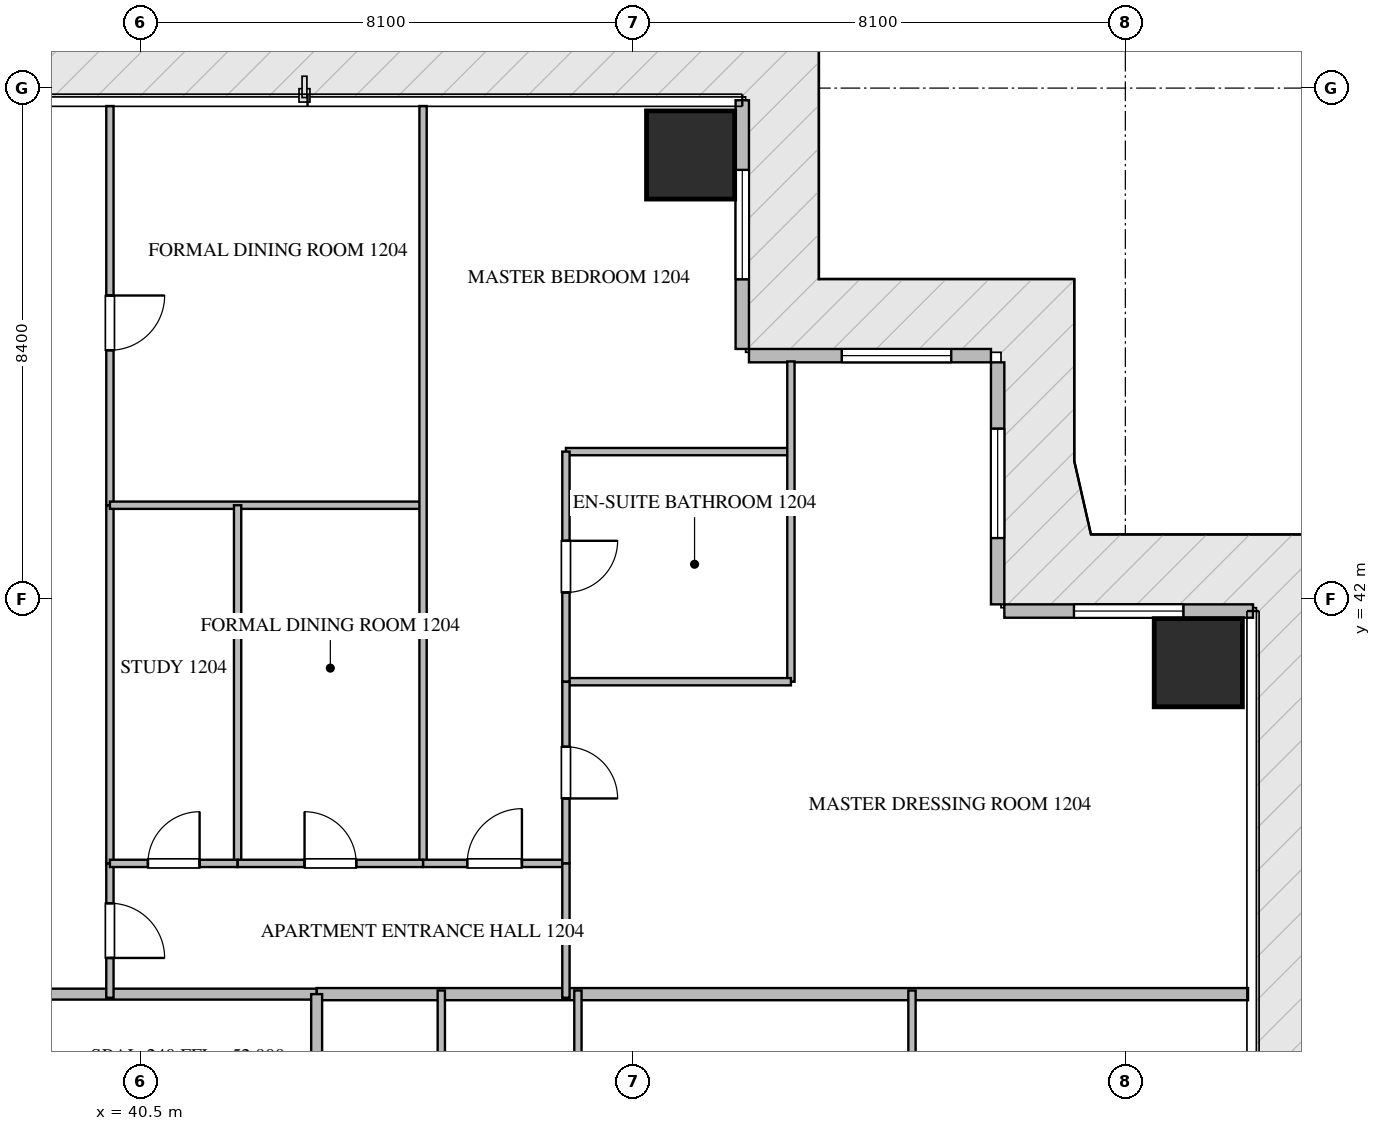
"""IFC4 building model, lengths in metres.
Left out: names, types, materials, properties, quantities, classifications, styles, units other than length and angle.
Written with IfcOpenShell. Run it as: python <this file> out.ifc"""

import sys

from ifc_helpers import new_model, si_unit, direction, frame, frame_2d, origin, origin_2d, place, context, subcontext, project, spatial, rectangle, extrude, source, transform, mapped, element, fill, save


model = new_model("IFC4")
c1 = context("Model", 3, precision=1e-05, world=origin(), true_north=direction((0.0, 1.0)))
c2 = subcontext(c1, "Body", "Model", "MODEL_VIEW")
j1 = project(units=[si_unit("LENGTHUNIT", "METRE"), si_unit("PLANEANGLEUNIT", "RADIAN")], contexts=[c1])
p1 = place(None, origin())
s1 = spatial("IfcSite", under=j1, at=p1, CompositionType="ELEMENT")
p2 = place(p1, origin())
s2 = spatial("IfcBuilding", under=s1, at=p2, CompositionType="ELEMENT")
p3 = place(p2, frame((0.0, 0.0, 52.95)))
s3 = spatial("IfcBuildingStorey", under=s2, at=p3, CompositionType="ELEMENT", Elevation=52.95)
m1 = source(origin(), c2, "Body", "SweptSolid", [
    extrude(rectangle(XDim=1.45, YDim=1.45, at=origin_2d()), origin(), (0.0, 0.0, 1.0), 3.75),
])
for number, where, z_axis, x_axis in (
    (1, (49.55, 49.3, -0.26), (0.0, 0.0, 1.0), (1.0, 0.0, 0.0)),
    (2, (57.9, 40.95, -0.26), (0.0, 0.0, 1.0), (1.0, 0.0, 0.0)),
):
    element("IfcColumn", number, at=place(p3, frame(where, z_axis=z_axis, x_axis=x_axis)), inside=s3, PredefinedType="COLUMN", context=c2, shape_type="MappedRepresentation", body=[
        mapped(m1, transform((0.0, 0.0, 0.0), scale=1.0)),
    ])
p4 = place(p3, frame((58.8, 41.8, 0.0), z_axis=(0.0, 0.0, 1.0), x_axis=(-1.0, 0.0, 0.0)))
e3 = element("IfcWall", 3, at=p4, inside=s3, PredefinedType="ELEMENTEDWALL", context=c2, shape_type="SweptSolid", body=[
    extrude(rectangle(XDim=4.09, YDim=0.22, at=frame_2d((2.045, 0.0))), origin(), (0.0, 0.0, 1.0), 3.475),
])
p5 = place(p4, frame((1.145, 0.0, 0.65)))
e4 = element("IfcOpeningElement", 4, at=p5, cuts=e3, PredefinedType="OPENING", context=c2, shape_type="SweptSolid", body=[
    extrude(rectangle(XDim=1.8, YDim=2.1, at=frame_2d((0.9, 1.05))), frame((0.0, 0.12, 0.0), z_axis=(0.0, -1.0, 0.0), x_axis=(1.0, 0.0, 0.0)), (0.0, 0.0, 1.0), 0.24),
])
p6 = place(p3, frame((54.6, 41.91, 0.0), z_axis=(0.0, 0.0, 1.0), x_axis=(0.0, 1.0, 0.0)))
e5 = element("IfcWall", 5, at=p6, inside=s3, PredefinedType="ELEMENTEDWALL", context=c2, shape_type="SweptSolid", body=[
    extrude(rectangle(XDim=3.98, YDim=0.22, at=frame_2d((1.99, 0.0))), origin(), (0.0, 0.0, 1.0), 3.475),
])
p7 = place(p6, frame((1.09, 0.0, 0.65)))
e6 = element("IfcOpeningElement", 6, at=p7, cuts=e5, PredefinedType="OPENING", context=c2, shape_type="SweptSolid", body=[
    extrude(rectangle(XDim=1.8, YDim=2.1, at=frame_2d((0.9, 1.05))), frame((0.0, 0.12, 0.0), z_axis=(0.0, -1.0, 0.0), x_axis=(1.0, 0.0, 0.0)), (0.0, 0.0, 1.0), 0.24),
])
p8 = place(p3, frame((54.49, 46.0, 0.0), z_axis=(0.0, 0.0, 1.0), x_axis=(-1.0, 0.0, 0.0)))
e7 = element("IfcWall", 7, at=p8, inside=s3, PredefinedType="ELEMENTEDWALL", context=c2, shape_type="SweptSolid", body=[
    extrude(rectangle(XDim=3.98, YDim=0.22, at=frame_2d((1.99, 0.0))), origin(), (0.0, 0.0, 1.0), 3.475),
])
p9 = place(p8, frame((0.654, 0.0, 0.65)))
e8 = element("IfcOpeningElement", 8, at=p9, cuts=e7, PredefinedType="OPENING", context=c2, shape_type="SweptSolid", body=[
    extrude(rectangle(XDim=1.8, YDim=2.1, at=frame_2d((0.9, 1.05))), frame((0.0, 0.12, 0.0), z_axis=(0.0, -1.0, 0.0), x_axis=(1.0, 0.0, 0.0)), (0.0, 0.0, 1.0), 0.24),
])
p10 = place(p3, frame((50.4, 46.11, 0.0), z_axis=(0.0, 0.0, 1.0), x_axis=(0.0, 1.0, 0.0)))
e9 = element("IfcWall", 9, at=p10, inside=s3, PredefinedType="ELEMENTEDWALL", context=c2, shape_type="SweptSolid", body=[
    extrude(rectangle(XDim=4.09, YDim=0.22, at=frame_2d((2.045, 0.0))), origin(), (0.0, 0.0, 1.0), 3.475),
])
p11 = place(p10, frame((1.145, 0.0, 0.65)))
e10 = element("IfcOpeningElement", 10, at=p11, cuts=e9, PredefinedType="OPENING", context=c2, shape_type="SweptSolid", body=[
    extrude(rectangle(XDim=1.8, YDim=2.1, at=frame_2d((0.9, 1.05))), frame((0.0, 0.12, 0.0), z_axis=(0.0, -1.0, 0.0), x_axis=(1.0, 0.0, 0.0)), (0.0, 0.0, 1.0), 0.24),
])
p12 = place(p3, frame((43.4, 35.5, 0.0), z_axis=(0.0, 0.0, 1.0), x_axis=(1.0, 0.0, 0.0)))
e11 = element("IfcWall", 11, at=p12, inside=s3, PredefinedType="PARTITIONING", context=c2, shape_type="SweptSolid", body=[
    extrude(rectangle(XDim=15.318, YDim=0.2, at=frame_2d((7.659, 0.0))), origin(), (0.0, 0.0, 1.0), 3.49),
])
p13 = place(p3, frame((21.402, 35.5, 0.0), z_axis=(0.0, 0.0, 1.0), x_axis=(1.0, 0.0, 0.0)))
e12 = element("IfcWall", 12, at=p13, inside=s3, PredefinedType="PARTITIONING", context=c2, shape_type="SweptSolid", body=[
    extrude(rectangle(XDim=21.996, YDim=0.18, at=frame_2d((10.998, 0.0))), origin(), (0.0, 0.0, 1.0), 3.49),
])
p14 = place(p13, frame((15.222, 0.0, 0.0)))
e13 = element("IfcOpeningElement", 13, at=p14, cuts=e12, PredefinedType="OPENING", context=c2, shape_type="SweptSolid", body=[
    extrude(rectangle(XDim=1.0, YDim=2.15, at=frame_2d((0.5, 1.075))), frame((0.0, 0.1, 0.0), z_axis=(0.0, -1.0, 0.0), x_axis=(1.0, 0.0, 0.0)), (0.0, 0.0, 1.0), 0.2),
])
p15 = place(p3, frame((43.4, 14.9, 0.0), z_axis=(0.0, 0.0, 1.0), x_axis=(0.0, 1.0, 0.0)))
e14 = element("IfcWall", 14, at=p15, inside=s3, PredefinedType="PARTITIONING", context=c2, shape_type="SweptSolid", body=[
    extrude(rectangle(XDim=20.6, YDim=0.18, at=frame_2d((10.3, 0.0))), origin(), (0.0, 0.0, 1.0), 3.49),
])
p16 = place(p15, frame((5.821, 0.0, 0.0)))
e15 = element("IfcOpeningElement", 15, at=p16, cuts=e14, PredefinedType="OPENING", context=c2, shape_type="SweptSolid", body=[
    extrude(rectangle(XDim=1.0, YDim=2.15, at=frame_2d((0.5, 1.075))), frame((0.0, 0.1, 0.0), z_axis=(0.0, -1.0, 0.0), x_axis=(1.0, 0.0, 0.0)), (0.0, 0.0, 1.0), 0.2),
])
p17 = place(p15, frame((10.898, 0.0, 0.0)))
e16 = element("IfcOpeningElement", 16, at=p17, cuts=e14, PredefinedType="OPENING", context=c2, shape_type="SweptSolid", body=[
    extrude(rectangle(XDim=1.0, YDim=2.15, at=frame_2d((0.5, 1.075))), frame((0.0, 0.1, 0.0), z_axis=(0.0, -1.0, 0.0), x_axis=(1.0, 0.0, 0.0)), (0.0, 0.0, 1.0), 0.2),
])
p18 = place(p3, frame((40.0, 37.65, 0.0), z_axis=(0.0, 0.0, 1.0), x_axis=(0.0, -1.0, 0.0)))
e17 = element("IfcWall", 17, at=p18, inside=s3, PredefinedType="PARTITIONING", context=c2, shape_type="SweptSolid", body=[
    extrude(rectangle(XDim=2.21, YDim=0.12, at=frame_2d((1.105, 0.0))), origin(), (0.0, 0.0, 1.0), 3.49),
])
p19 = place(p18, frame((0.655, 0.0, 0.0)))
e18 = element("IfcOpeningElement", 18, at=p19, cuts=e17, PredefinedType="OPENING", context=c2, shape_type="SweptSolid", body=[
    extrude(rectangle(XDim=0.9, YDim=2.1, at=frame_2d((0.45, 1.05))), frame((0.0, 0.07, 0.0), z_axis=(0.0, -1.0, 0.0), x_axis=(1.0, 0.0, 0.0)), (0.0, 0.0, 1.0), 0.14),
])
p20 = place(p3, frame((40.0, 50.105, 0.0), z_axis=(0.0, 0.0, 1.0), x_axis=(0.0, -1.0, 0.0)))
e19 = element("IfcWall", 19, at=p20, inside=s3, PredefinedType="PARTITIONING", context=c2, shape_type="SweptSolid", body=[
    extrude(rectangle(XDim=6.565, YDim=0.12, at=frame_2d((3.282, 0.0))), origin(), (0.0, 0.0, 1.0), 3.49),
])
p21 = place(p20, frame((3.116, 0.0, 0.0)))
e20 = element("IfcOpeningElement", 20, at=p21, cuts=e19, PredefinedType="OPENING", context=c2, shape_type="SweptSolid", body=[
    extrude(rectangle(XDim=0.9, YDim=2.1, at=frame_2d((0.45, 1.05))), frame((0.0, 0.07, 0.0), z_axis=(0.0, -1.0, 0.0), x_axis=(1.0, 0.0, 0.0)), (0.0, 0.0, 1.0), 0.14),
])
p22 = place(p3, frame((40.0, 43.538, 0.0), z_axis=(0.0, 0.0, 1.0), x_axis=(0.0, -1.0, 0.0)))
e21 = element("IfcWall", 21, at=p22, inside=s3, PredefinedType="PARTITIONING", context=c2, shape_type="SweptSolid", body=[
    extrude(rectangle(XDim=5.886, YDim=0.12, at=frame_2d((2.943, 0.0))), origin(), (0.0, 0.0, 1.0), 3.49),
])
p23 = place(p3, frame((40.0, 43.54, 0.0), z_axis=(0.0, 0.0, 1.0), x_axis=(1.0, 0.0, 0.0)))
e22 = element("IfcWall", 22, at=p23, inside=s3, PredefinedType="PARTITIONING", context=c2, shape_type="SweptSolid", body=[
    extrude(rectangle(XDim=5.15, YDim=0.12, at=frame_2d((2.575, 0.0))), origin(), (0.0, 0.0, 1.0), 3.49),
])
p24 = place(p3, frame((45.15, 50.105, 0.0), z_axis=(0.0, 0.0, 1.0), x_axis=(0.0, -1.0, 0.0)))
e23 = element("IfcWall", 23, at=p24, inside=s3, PredefinedType="PARTITIONING", context=c2, shape_type="SweptSolid", body=[
    extrude(rectangle(XDim=12.455, YDim=0.12, at=frame_2d((6.228, 0.0))), origin(), (0.0, 0.0, 1.0), 3.49),
])
p25 = place(p3, frame((42.1, 43.54, 0.0), z_axis=(0.0, 0.0, 1.0), x_axis=(0.0, -1.0, 0.0)))
e24 = element("IfcWall", 24, at=p25, inside=s3, PredefinedType="PARTITIONING", context=c2, shape_type="SweptSolid", body=[
    extrude(rectangle(XDim=5.89, YDim=0.12, at=frame_2d((2.945, 0.0))), origin(), (0.0, 0.0, 1.0), 3.49),
])
p26 = place(p3, frame((40.0, 37.65, 0.0), z_axis=(0.0, 0.0, 1.0), x_axis=(1.0, 0.0, 0.0)))
e25 = element("IfcWall", 25, at=p26, inside=s3, PredefinedType="PARTITIONING", context=c2, shape_type="SweptSolid", body=[
    extrude(rectangle(XDim=2.1, YDim=0.12, at=frame_2d((1.05, 0.0))), origin(), (0.0, 0.0, 1.0), 3.49),
])
p27 = place(p26, frame((0.625, 0.0, 0.0)))
e26 = element("IfcOpeningElement", 26, at=p27, cuts=e25, PredefinedType="OPENING", context=c2, shape_type="SweptSolid", body=[
    extrude(rectangle(XDim=0.85, YDim=2.1, at=frame_2d((0.425, 1.05))), frame((0.0, 0.07, 0.0), z_axis=(0.0, -1.0, 0.0), x_axis=(1.0, 0.0, 0.0)), (0.0, 0.0, 1.0), 0.14),
])
p28 = place(p3, frame((42.102, 37.65, 0.0), z_axis=(0.0, 0.0, 1.0), x_axis=(1.0, 0.0, 0.0)))
e27 = element("IfcWall", 27, at=p28, inside=s3, PredefinedType="PARTITIONING", context=c2, shape_type="SweptSolid", body=[
    extrude(rectangle(XDim=3.048, YDim=0.12, at=frame_2d((1.524, 0.0))), origin(), (0.0, 0.0, 1.0), 3.49),
])
p29 = place(p28, frame((1.099, 0.0, 0.0)))
e28 = element("IfcOpeningElement", 28, at=p29, cuts=e27, PredefinedType="OPENING", context=c2, shape_type="SweptSolid", body=[
    extrude(rectangle(XDim=0.85, YDim=2.1, at=frame_2d((0.425, 1.05))), frame((0.0, 0.07, 0.0), z_axis=(0.0, -1.0, 0.0), x_axis=(1.0, 0.0, 0.0)), (0.0, 0.0, 1.0), 0.14),
])
p30 = place(p3, frame((45.152, 37.65, 0.0), z_axis=(0.0, 0.0, 1.0), x_axis=(1.0, 0.0, 0.0)))
e29 = element("IfcWall", 29, at=p30, inside=s3, PredefinedType="PARTITIONING", context=c2, shape_type="SweptSolid", body=[
    extrude(rectangle(XDim=2.348, YDim=0.12, at=frame_2d((1.174, 0.0))), origin(), (0.0, 0.0, 1.0), 3.49),
])
p31 = place(p30, frame((0.724, 0.0, 0.0)))
e30 = element("IfcOpeningElement", 30, at=p31, cuts=e29, PredefinedType="OPENING", context=c2, shape_type="SweptSolid", body=[
    extrude(rectangle(XDim=0.9, YDim=2.1, at=frame_2d((0.45, 1.05))), frame((0.0, 0.07, 0.0), z_axis=(0.0, -1.0, 0.0), x_axis=(1.0, 0.0, 0.0)), (0.0, 0.0, 1.0), 0.14),
])
p32 = place(p3, frame((47.5, 44.422, 0.0), z_axis=(0.0, 0.0, 1.0), x_axis=(1.0, 0.0, 0.0)))
e31 = element("IfcWall", 31, at=p32, inside=s3, PredefinedType="PARTITIONING", context=c2, shape_type="SweptSolid", body=[
    extrude(rectangle(XDim=3.7, YDim=0.12, at=frame_2d((1.85, 0.0))), origin(), (0.0, 0.0, 1.0), 3.49),
])
p33 = place(p3, frame((51.2, 45.905, 0.0), z_axis=(0.0, 0.0, 1.0), x_axis=(0.0, -1.0, 0.0)))
e32 = element("IfcWall", 32, at=p33, inside=s3, PredefinedType="PARTITIONING", context=c2, shape_type="SweptSolid", body=[
    extrude(rectangle(XDim=5.267, YDim=0.12, at=frame_2d((2.634, 0.0))), origin(), (0.0, 0.0, 1.0), 3.49),
])
p34 = place(p3, frame((47.5, 40.638, 0.0), z_axis=(0.0, 0.0, 1.0), x_axis=(1.0, 0.0, 0.0)))
e33 = element("IfcWall", 33, at=p34, inside=s3, PredefinedType="PARTITIONING", context=c2, shape_type="SweptSolid", body=[
    extrude(rectangle(XDim=3.7, YDim=0.12, at=frame_2d((1.85, 0.0))), origin(), (0.0, 0.0, 1.0), 3.49),
])
p35 = place(p3, frame((47.5, 44.422, 0.0), z_axis=(0.0, 0.0, 1.0), x_axis=(0.0, -1.0, 0.0)))
e34 = element("IfcWall", 34, at=p35, inside=s3, PredefinedType="PARTITIONING", context=c2, shape_type="SweptSolid", body=[
    extrude(rectangle(XDim=3.784, YDim=0.12, at=frame_2d((1.892, 0.0))), origin(), (0.0, 0.0, 1.0), 3.49),
])
p36 = place(p35, frame((1.467, 0.0, 0.0)))
e35 = element("IfcOpeningElement", 35, at=p36, cuts=e34, PredefinedType="OPENING", context=c2, shape_type="SweptSolid", body=[
    extrude(rectangle(XDim=0.85, YDim=2.1, at=frame_2d((0.425, 1.05))), frame((0.0, 0.07, 0.0), z_axis=(0.0, -1.0, 0.0), x_axis=(1.0, 0.0, 0.0)), (0.0, 0.0, 1.0), 0.14),
])
p37 = place(p3, frame((47.5, 40.636, 0.0), z_axis=(0.0, 0.0, 1.0), x_axis=(0.0, -1.0, 0.0)))
e36 = element("IfcWall", 36, at=p37, inside=s3, PredefinedType="PARTITIONING", context=c2, shape_type="SweptSolid", body=[
    extrude(rectangle(XDim=2.986, YDim=0.12, at=frame_2d((1.493, 0.0))), origin(), (0.0, 0.0, 1.0), 3.49),
])
p38 = place(p37, frame((1.068, 0.0, 0.0)))
e37 = element("IfcOpeningElement", 37, at=p38, cuts=e36, PredefinedType="OPENING", context=c2, shape_type="SweptSolid", body=[
    extrude(rectangle(XDim=0.85, YDim=2.1, at=frame_2d((0.425, 1.05))), frame((0.0, 0.07, 0.0), z_axis=(0.0, -1.0, 0.0), x_axis=(1.0, 0.0, 0.0)), (0.0, 0.0, 1.0), 0.14),
])
p39 = place(p3, frame((47.5, 37.648, 0.0), z_axis=(0.0, 0.0, 1.0), x_axis=(0.0, -1.0, 0.0)))
e38 = element("IfcWall", 38, at=p39, inside=s3, PredefinedType="PARTITIONING", context=c2, shape_type="SweptSolid", body=[
    extrude(rectangle(XDim=2.208, YDim=0.12, at=frame_2d((1.104, 0.0))), origin(), (0.0, 0.0, 1.0), 3.49),
])
for number, where, z_axis, x_axis in (
    (39, (53.191, 27.8, 0.0), (0.0, 0.0, 1.0), (0.0, 1.0, 0.0)),
    (40, (47.697, 27.8, 0.0), (0.0, 0.0, 1.0), (0.0, 1.0, 0.0)),
    (41, (45.45, 27.8, 0.0), (0.0, 0.0, 1.0), (0.0, 1.0, 0.0)),
):
    element("IfcWall", number, at=place(p3, frame(where, z_axis=z_axis, x_axis=x_axis)), inside=s3, PredefinedType="PARTITIONING", context=c2, shape_type="SweptSolid", body=[
        extrude(rectangle(XDim=7.76, YDim=0.12, at=frame_2d((3.88, 0.0))), origin(), (0.0, 0.0, 1.0), 3.49),
    ])
m2 = source(origin(), c2, "Body", "SweptSolid", [
    extrude(rectangle(XDim=1.8, YDim=2.1, at=frame_2d((0.9, 1.05))), frame((0.0, 0.03, 0.0), z_axis=(0.0, -1.0, 0.0), x_axis=(1.0, 0.0, 0.0)), (0.0, 0.0, 1.0), 0.06),
])
p40 = place(p5, origin())
e42 = element("IfcWindow", 42, at=p40, inside=s3, PartitioningType="SINGLE_PANEL", PredefinedType="WINDOW", context=c2, shape_type="MappedRepresentation", body=[
    mapped(m2, transform((0.0, 0.0, 0.0), scale=1.0)),
])
fill(e4, e42)
p41 = place(p7, origin())
e43 = element("IfcWindow", 43, at=p41, inside=s3, PartitioningType="SINGLE_PANEL", PredefinedType="WINDOW", context=c2, shape_type="MappedRepresentation", body=[
    mapped(m2, transform((0.0, 0.0, 0.0), scale=1.0)),
])
fill(e6, e43)
p42 = place(p9, origin())
e44 = element("IfcWindow", 44, at=p42, inside=s3, PartitioningType="SINGLE_PANEL", PredefinedType="WINDOW", context=c2, shape_type="MappedRepresentation", body=[
    mapped(m2, transform((0.0, 0.0, 0.0), scale=1.0)),
])
fill(e8, e44)
p43 = place(p11, origin())
e45 = element("IfcWindow", 45, at=p43, inside=s3, PartitioningType="SINGLE_PANEL", PredefinedType="WINDOW", context=c2, shape_type="MappedRepresentation", body=[
    mapped(m2, transform((0.0, 0.0, 0.0), scale=1.0)),
])
fill(e10, e45)
m3 = source(origin(), c2, "Body", "SweptSolid", [
    extrude(rectangle(XDim=0.9, YDim=2.1, at=frame_2d((0.45, 1.05))), frame((0.0, 0.025, 0.0), z_axis=(0.0, -1.0, 0.0), x_axis=(1.0, 0.0, 0.0)), (0.0, 0.0, 1.0), 0.05),
])
p44 = place(p19, origin())
e46 = element("IfcDoor", 46, at=p44, inside=s3, OperationType="SINGLE_SWING_RIGHT", PredefinedType="DOOR", context=c2, shape_type="MappedRepresentation", body=[
    mapped(m3, transform((0.0, 0.0, 0.0), scale=1.0)),
])
fill(e18, e46)
p45 = place(p21, origin())
e47 = element("IfcDoor", 47, at=p45, inside=s3, OperationType="SINGLE_SWING_LEFT", PredefinedType="DOOR", context=c2, shape_type="MappedRepresentation", body=[
    mapped(m3, transform((0.0, 0.0, 0.0), scale=1.0)),
])
fill(e20, e47)
m4 = source(origin(), c2, "Body", "SweptSolid", [
    extrude(rectangle(XDim=0.85, YDim=2.1, at=frame_2d((0.425, 1.05))), frame((0.0, 0.025, 0.0), z_axis=(0.0, -1.0, 0.0), x_axis=(1.0, 0.0, 0.0)), (0.0, 0.0, 1.0), 0.05),
])
p46 = place(p27, origin())
e48 = element("IfcDoor", 48, at=p46, inside=s3, OperationType="SINGLE_SWING_RIGHT", PredefinedType="DOOR", context=c2, shape_type="MappedRepresentation", body=[
    mapped(m4, transform((0.0, 0.0, 0.0), scale=1.0)),
])
fill(e26, e48)
p47 = place(p29, origin())
e49 = element("IfcDoor", 49, at=p47, inside=s3, OperationType="SINGLE_SWING_LEFT", PredefinedType="DOOR", context=c2, shape_type="MappedRepresentation", body=[
    mapped(m4, transform((0.0, 0.0, 0.0), scale=1.0)),
])
fill(e28, e49)
p48 = place(p31, origin())
e50 = element("IfcDoor", 50, at=p48, inside=s3, OperationType="SINGLE_SWING_RIGHT", PredefinedType="DOOR", context=c2, shape_type="MappedRepresentation", body=[
    mapped(m3, transform((0.0, 0.0, 0.0), scale=1.0)),
])
fill(e30, e50)
p49 = place(p36, origin())
e51 = element("IfcDoor", 51, at=p49, inside=s3, OperationType="SINGLE_SWING_LEFT", PredefinedType="DOOR", context=c2, shape_type="MappedRepresentation", body=[
    mapped(m4, transform((0.0, 0.0, 0.0), scale=1.0)),
])
fill(e35, e51)
p50 = place(p38, origin())
e52 = element("IfcDoor", 52, at=p50, inside=s3, OperationType="SINGLE_SWING_RIGHT", PredefinedType="DOOR", context=c2, shape_type="MappedRepresentation", body=[
    mapped(m4, transform((0.0, 0.0, 0.0), scale=1.0)),
])
fill(e37, e52)
save(model, sys.argv[1])
